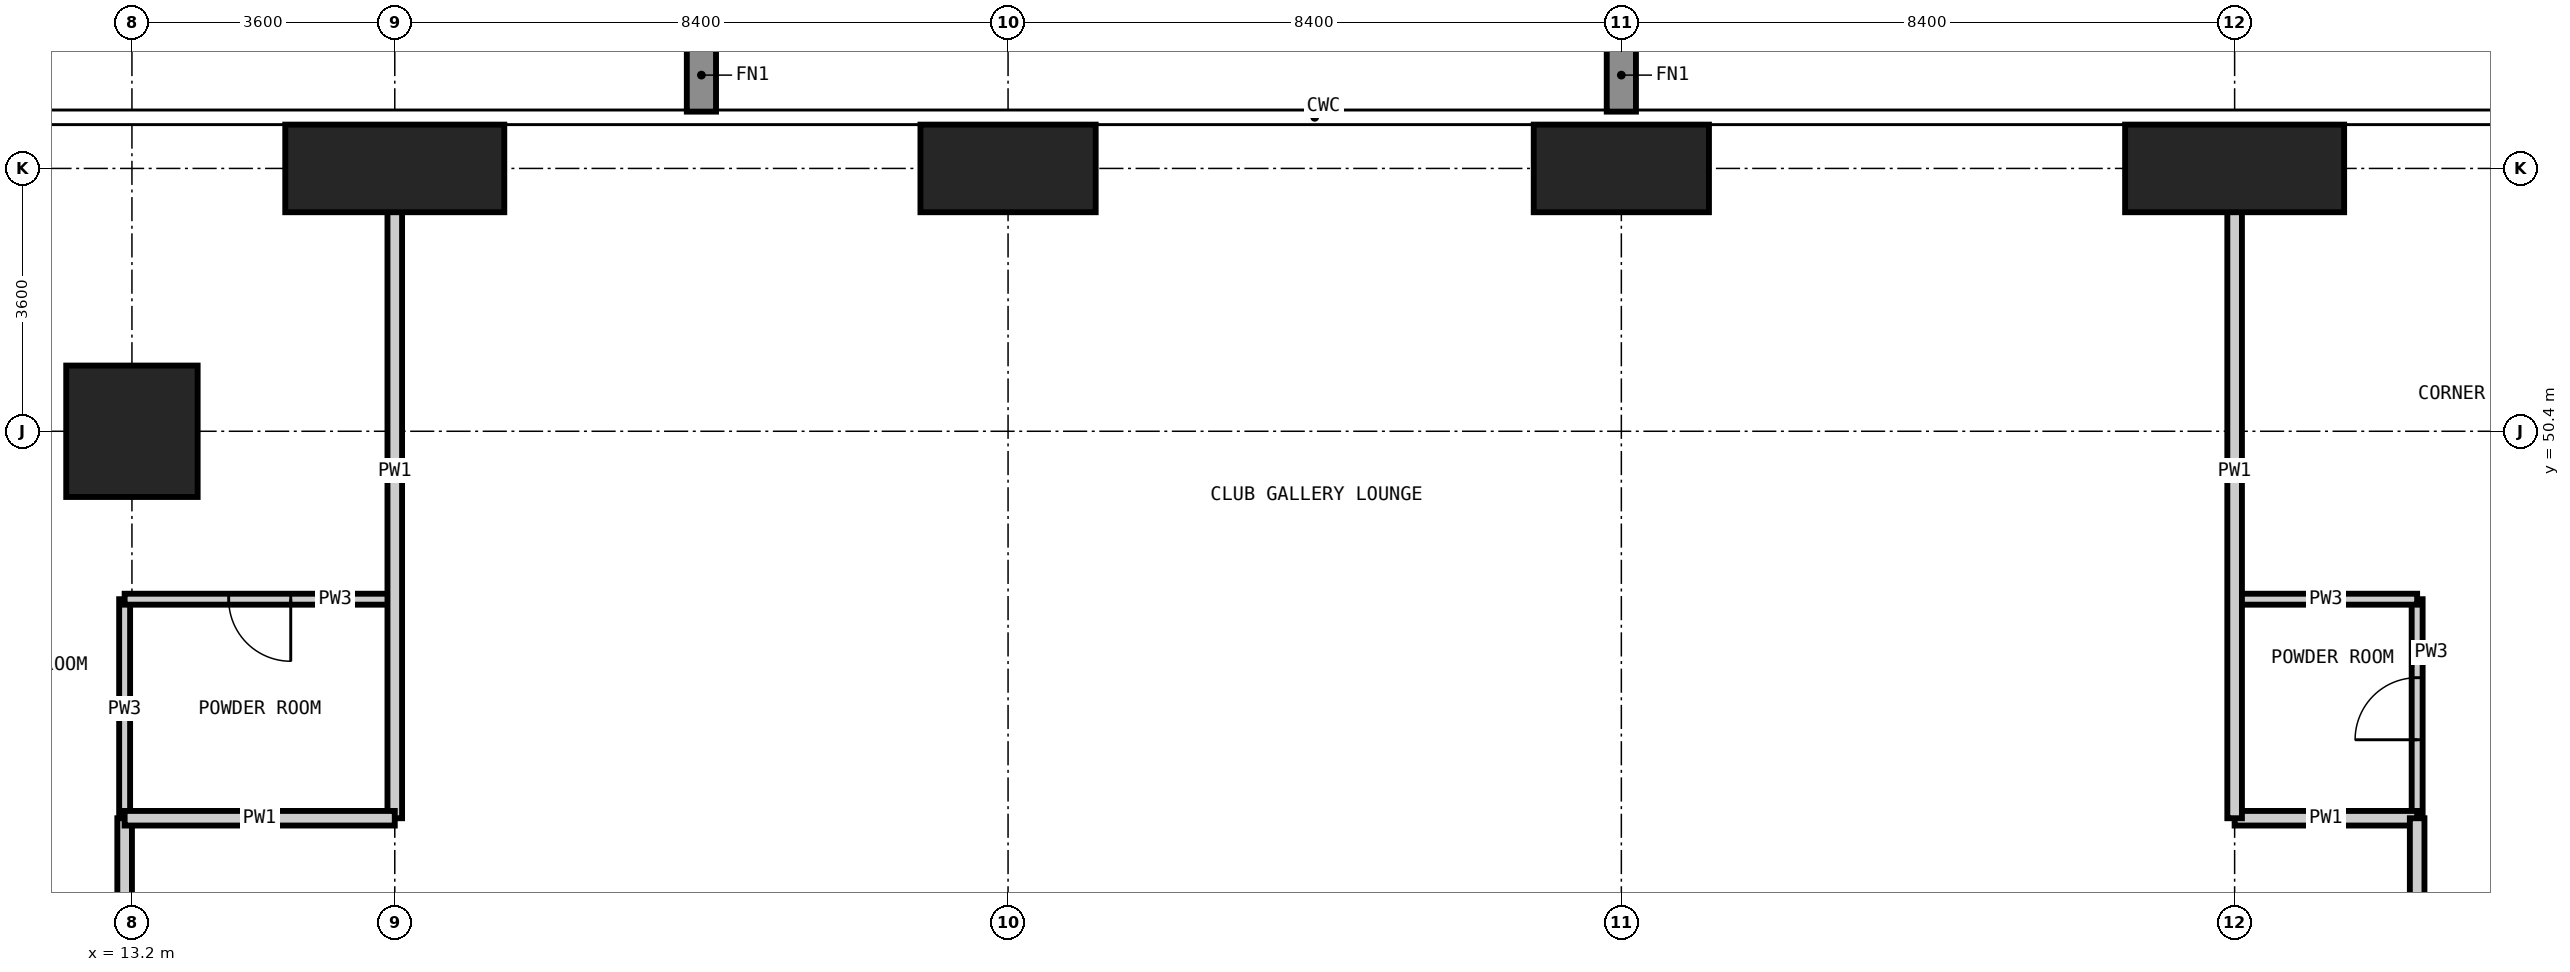
"""IFC4 building model, lengths in metres.
Left out: names, types, materials, properties, quantities, classifications, styles, units other than length and angle.
Written with IfcOpenShell. Run it as: python <this file> out.ifc"""

import sys

from ifc_helpers import new_model, si_unit, direction, frame, frame_2d, origin, origin_2d, place, context, subcontext, project, spatial, rectangle, extrude, element, fill, save


model = new_model("IFC4")
c1 = context("Model", 3, precision=1e-05, world=origin(), true_north=direction((0.0, 1.0)))
c2 = subcontext(c1, "Body", "Model", "MODEL_VIEW")
j1 = project(units=[si_unit("LENGTHUNIT", "METRE"), si_unit("PLANEANGLEUNIT", "RADIAN")], contexts=[c1])
p1 = place(None, origin())
s1 = spatial("IfcSite", under=j1, at=p1, CompositionType="ELEMENT")
p2 = place(p1, origin())
s2 = spatial("IfcBuilding", under=s1, at=p2, CompositionType="ELEMENT")
p3 = place(p2, frame((0.0, 0.0, 216.6)))
s3 = spatial("IfcBuildingStorey", under=s2, at=p3, CompositionType="ELEMENT", Elevation=216.6)
p4 = place(p3, frame((13.2, 50.4, -0.35), z_axis=(0.0, 0.0, 1.0), x_axis=(1.0, 0.0, 0.0)))
e1 = element("IfcColumn", 1, at=p4, inside=s3, PredefinedType="COLUMN", context=c2, shape_type="SweptSolid", body=[
    extrude(rectangle(XDim=1.8, YDim=1.8, at=origin_2d()), origin(), (0.0, 0.0, 1.0), 3.55),
])
p5 = place(p3, frame((16.8, 54.0, -0.35), z_axis=(0.0, 0.0, 1.0), x_axis=(1.0, 0.0, 0.0)))
e2 = element("IfcColumn", 2, at=p5, inside=s3, PredefinedType="COLUMN", context=c2, shape_type="SweptSolid", body=[
    extrude(rectangle(XDim=3.0, YDim=1.2, at=origin_2d()), origin(), (0.0, 0.0, 1.0), 3.55),
])
for number, where, z_axis, x_axis in (
    (3, (25.2, 54.0, -0.35), (0.0, 0.0, 1.0), (1.0, 0.0, 0.0)),
    (4, (33.6, 54.0, -0.35), (0.0, 0.0, 1.0), (1.0, 0.0, 0.0)),
):
    element("IfcColumn", number, at=place(p3, frame(where, z_axis=z_axis, x_axis=x_axis)), inside=s3, PredefinedType="COLUMN", context=c2, shape_type="SweptSolid", body=[
        extrude(rectangle(XDim=2.4, YDim=1.2, at=origin_2d()), origin(), (0.0, 0.0, 1.0), 3.55),
    ])
p6 = place(p3, frame((42.0, 54.0, -0.35), z_axis=(0.0, 0.0, 1.0), x_axis=(1.0, 0.0, 0.0)))
e5 = element("IfcColumn", 5, at=p6, inside=s3, PredefinedType="COLUMN", context=c2, shape_type="SweptSolid", body=[
    extrude(rectangle(XDim=3.0, YDim=1.2, at=origin_2d()), origin(), (0.0, 0.0, 1.0), 3.55),
])
p7 = place(p3, frame((13.1, 45.1, 0.0), z_axis=(0.0, 0.0, 1.0), x_axis=(0.0, 1.0, 0.0)))
e6 = element("IfcWall", 6, at=p7, inside=s3, PredefinedType="PARTITIONING", context=c2, shape_type="SweptSolid", body=[
    extrude(rectangle(XDim=3.0, YDim=0.15, at=frame_2d((1.5, 0.0))), origin(), (0.0, 0.0, 1.0), 3.2),
])
p8 = place(p3, frame((44.5, 45.1, 0.0), z_axis=(0.0, 0.0, 1.0), x_axis=(0.0, 1.0, 0.0)))
e7 = element("IfcWall", 7, at=p8, inside=s3, PredefinedType="PARTITIONING", context=c2, shape_type="SweptSolid", body=[
    extrude(rectangle(XDim=3.0, YDim=0.15, at=frame_2d((1.5, 0.0))), origin(), (0.0, 0.0, 1.0), 3.2),
])
p9 = place(p8, frame((1.075, 0.0, 0.0)))
e8 = element("IfcOpeningElement", 8, at=p9, cuts=e7, PredefinedType="OPENING", context=c2, shape_type="SweptSolid", body=[
    extrude(rectangle(XDim=0.85, YDim=2.1, at=frame_2d((0.425, 1.05))), frame((0.0, 0.085, 0.0), z_axis=(0.0, -1.0, 0.0), x_axis=(1.0, 0.0, 0.0)), (0.0, 0.0, 1.0), 0.17),
])
p10 = place(p3, frame((13.1, 48.1, 0.0), z_axis=(0.0, 0.0, 1.0), x_axis=(1.0, 0.0, 0.0)))
e9 = element("IfcWall", 9, at=p10, inside=s3, PredefinedType="PARTITIONING", context=c2, shape_type="SweptSolid", body=[
    extrude(rectangle(XDim=3.7, YDim=0.15, at=frame_2d((1.85, 0.0))), origin(), (0.0, 0.0, 1.0), 3.2),
])
p11 = place(p10, frame((1.425, 0.0, 0.0)))
e10 = element("IfcOpeningElement", 10, at=p11, cuts=e9, PredefinedType="OPENING", context=c2, shape_type="SweptSolid", body=[
    extrude(rectangle(XDim=0.85, YDim=2.1, at=frame_2d((0.425, 1.05))), frame((0.0, 0.085, 0.0), z_axis=(0.0, -1.0, 0.0), x_axis=(1.0, 0.0, 0.0)), (0.0, 0.0, 1.0), 0.17),
])
p12 = place(p3, frame((42.0, 48.1, 0.0), z_axis=(0.0, 0.0, 1.0), x_axis=(1.0, 0.0, 0.0)))
e11 = element("IfcWall", 11, at=p12, inside=s3, PredefinedType="PARTITIONING", context=c2, shape_type="SweptSolid", body=[
    extrude(rectangle(XDim=2.5, YDim=0.15, at=frame_2d((1.25, 0.0))), origin(), (0.0, 0.0, 1.0), 3.2),
])
p13 = place(p3, frame((13.1, 13.1, 0.0), z_axis=(0.0, 0.0, 1.0), x_axis=(0.0, 1.0, 0.0)))
e12 = element("IfcWall", 12, at=p13, inside=s3, PredefinedType="PARTITIONING", context=c2, shape_type="SweptSolid", body=[
    extrude(rectangle(XDim=32.0, YDim=0.2, at=frame_2d((16.0, 0.0))), origin(), (0.0, 0.0, 1.0), 3.2),
])
p14 = place(p13, frame((5.3, 0.0, 0.0)))
e13 = element("IfcOpeningElement", 13, at=p14, cuts=e12, PredefinedType="OPENING", context=c2, shape_type="SweptSolid", body=[
    extrude(rectangle(XDim=1.0, YDim=2.2, at=frame_2d((0.5, 1.1))), frame((0.0, 0.11, 0.0), z_axis=(0.0, -1.0, 0.0), x_axis=(1.0, 0.0, 0.0)), (0.0, 0.0, 1.0), 0.22),
])
p15 = place(p13, frame((13.1, 0.0, 0.0)))
e14 = element("IfcOpeningElement", 14, at=p15, cuts=e12, PredefinedType="OPENING", context=c2, shape_type="SweptSolid", body=[
    extrude(rectangle(XDim=1.0, YDim=2.2, at=frame_2d((0.5, 1.1))), frame((0.0, 0.11, 0.0), z_axis=(0.0, -1.0, 0.0), x_axis=(1.0, 0.0, 0.0)), (0.0, 0.0, 1.0), 0.22),
])
p16 = place(p13, frame((18.5, 0.0, 0.0)))
e15 = element("IfcOpeningElement", 15, at=p16, cuts=e12, PredefinedType="OPENING", context=c2, shape_type="SweptSolid", body=[
    extrude(rectangle(XDim=1.0, YDim=2.2, at=frame_2d((0.5, 1.1))), frame((0.0, 0.11, 0.0), z_axis=(0.0, -1.0, 0.0), x_axis=(1.0, 0.0, 0.0)), (0.0, 0.0, 1.0), 0.22),
])
p17 = place(p13, frame((26.3, 0.0, 0.0)))
e16 = element("IfcOpeningElement", 16, at=p17, cuts=e12, PredefinedType="OPENING", context=c2, shape_type="SweptSolid", body=[
    extrude(rectangle(XDim=1.0, YDim=2.2, at=frame_2d((0.5, 1.1))), frame((0.0, 0.11, 0.0), z_axis=(0.0, -1.0, 0.0), x_axis=(1.0, 0.0, 0.0)), (0.0, 0.0, 1.0), 0.22),
])
p18 = place(p13, frame((1.35, 0.0, 0.0)))
e17 = element("IfcOpeningElement", 17, at=p18, cuts=e12, PredefinedType="OPENING", context=c2, shape_type="SweptSolid", body=[
    extrude(rectangle(XDim=1.0, YDim=2.2, at=frame_2d((0.5, 1.1))), frame((0.0, 0.11, 0.0), z_axis=(0.0, -1.0, 0.0), x_axis=(1.0, 0.0, 0.0)), (0.0, 0.0, 1.0), 0.22),
])
p19 = place(p13, frame((29.95, 0.0, 0.0)))
e18 = element("IfcOpeningElement", 18, at=p19, cuts=e12, PredefinedType="OPENING", context=c2, shape_type="SweptSolid", body=[
    extrude(rectangle(XDim=1.0, YDim=2.2, at=frame_2d((0.5, 1.1))), frame((0.0, 0.11, 0.0), z_axis=(0.0, -1.0, 0.0), x_axis=(1.0, 0.0, 0.0)), (0.0, 0.0, 1.0), 0.22),
])
p20 = place(p3, frame((16.8, 45.1, 0.0), z_axis=(0.0, 0.0, 1.0), x_axis=(0.0, 1.0, 0.0)))
e19 = element("IfcWall", 19, at=p20, inside=s3, PredefinedType="PARTITIONING", context=c2, shape_type="SweptSolid", body=[
    extrude(rectangle(XDim=9.518, YDim=0.2, at=frame_2d((4.759, 0.0))), origin(), (0.0, 0.0, 1.0), 3.2),
])
p21 = place(p3, frame((13.1, 45.1, 0.0), z_axis=(0.0, 0.0, 1.0), x_axis=(1.0, 0.0, 0.0)))
e20 = element("IfcWall", 20, at=p21, inside=s3, PredefinedType="PARTITIONING", context=c2, shape_type="SweptSolid", body=[
    extrude(rectangle(XDim=3.7, YDim=0.2, at=frame_2d((1.85, 0.0))), origin(), (0.0, 0.0, 1.0), 3.2),
])
p22 = place(p3, frame((42.0, 45.1, 0.0), z_axis=(0.0, 0.0, 1.0), x_axis=(1.0, 0.0, 0.0)))
e21 = element("IfcWall", 21, at=p22, inside=s3, PredefinedType="PARTITIONING", context=c2, shape_type="SweptSolid", body=[
    extrude(rectangle(XDim=2.5, YDim=0.2, at=frame_2d((1.25, 0.0))), origin(), (0.0, 0.0, 1.0), 3.2),
])
p23 = place(p3, frame((42.0, 54.618, 0.0), z_axis=(0.0, 0.0, 1.0), x_axis=(0.0, -1.0, 0.0)))
e22 = element("IfcWall", 22, at=p23, inside=s3, PredefinedType="PARTITIONING", context=c2, shape_type="SweptSolid", body=[
    extrude(rectangle(XDim=9.518, YDim=0.2, at=frame_2d((4.759, 0.0))), origin(), (0.0, 0.0, 1.0), 3.2),
])
p24 = place(p3, frame((44.5, 45.1, 0.0), z_axis=(0.0, 0.0, 1.0), x_axis=(0.0, -1.0, 0.0)))
e23 = element("IfcWall", 23, at=p24, inside=s3, PredefinedType="PARTITIONING", context=c2, shape_type="SweptSolid", body=[
    extrude(rectangle(XDim=32.0, YDim=0.2, at=frame_2d((16.0, 0.0))), origin(), (0.0, 0.0, 1.0), 3.2),
])
p25 = place(p24, frame((25.7, 0.0, 0.0)))
e24 = element("IfcOpeningElement", 24, at=p25, cuts=e23, PredefinedType="OPENING", context=c2, shape_type="SweptSolid", body=[
    extrude(rectangle(XDim=1.0, YDim=2.2, at=frame_2d((0.5, 1.1))), frame((0.0, 0.11, 0.0), z_axis=(0.0, -1.0, 0.0), x_axis=(1.0, 0.0, 0.0)), (0.0, 0.0, 1.0), 0.22),
])
p26 = place(p24, frame((19.4, 0.0, 0.0)))
e25 = element("IfcOpeningElement", 25, at=p26, cuts=e23, PredefinedType="OPENING", context=c2, shape_type="SweptSolid", body=[
    extrude(rectangle(XDim=1.0, YDim=2.2, at=frame_2d((0.5, 1.1))), frame((0.0, 0.11, 0.0), z_axis=(0.0, -1.0, 0.0), x_axis=(1.0, 0.0, 0.0)), (0.0, 0.0, 1.0), 0.22),
])
p27 = place(p24, frame((11.0, 0.0, 0.0)))
e26 = element("IfcOpeningElement", 26, at=p27, cuts=e23, PredefinedType="OPENING", context=c2, shape_type="SweptSolid", body=[
    extrude(rectangle(XDim=1.0, YDim=2.2, at=frame_2d((0.5, 1.1))), frame((0.0, 0.11, 0.0), z_axis=(0.0, -1.0, 0.0), x_axis=(1.0, 0.0, 0.0)), (0.0, 0.0, 1.0), 0.22),
])
p28 = place(p24, frame((4.7, 0.0, 0.0)))
e27 = element("IfcOpeningElement", 27, at=p28, cuts=e23, PredefinedType="OPENING", context=c2, shape_type="SweptSolid", body=[
    extrude(rectangle(XDim=1.0, YDim=2.2, at=frame_2d((0.5, 1.1))), frame((0.0, 0.11, 0.0), z_axis=(0.0, -1.0, 0.0), x_axis=(1.0, 0.0, 0.0)), (0.0, 0.0, 1.0), 0.22),
])
p29 = place(p24, frame((29.65, 0.0, 0.0)))
e28 = element("IfcOpeningElement", 28, at=p29, cuts=e23, PredefinedType="OPENING", context=c2, shape_type="SweptSolid", body=[
    extrude(rectangle(XDim=1.0, YDim=2.2, at=frame_2d((0.5, 1.1))), frame((0.0, 0.11, 0.0), z_axis=(0.0, -1.0, 0.0), x_axis=(1.0, 0.0, 0.0)), (0.0, 0.0, 1.0), 0.22),
])
p30 = place(p24, frame((1.05, 0.0, 0.0)))
e29 = element("IfcOpeningElement", 29, at=p30, cuts=e23, PredefinedType="OPENING", context=c2, shape_type="SweptSolid", body=[
    extrude(rectangle(XDim=1.0, YDim=2.2, at=frame_2d((0.5, 1.1))), frame((0.0, 0.11, 0.0), z_axis=(0.0, -1.0, 0.0), x_axis=(1.0, 0.0, 0.0)), (0.0, 0.0, 1.0), 0.22),
])
p31 = place(p9, origin())
e30 = element("IfcDoor", 30, at=p31, inside=s3, OperationType="SINGLE_SWING_LEFT", PredefinedType="DOOR", context=c2, shape_type="SweptSolid", body=[
    extrude(rectangle(XDim=0.85, YDim=2.1, at=frame_2d((0.425, 1.05))), frame((0.0, 0.025, 0.0), z_axis=(0.0, -1.0, 0.0), x_axis=(1.0, 0.0, 0.0)), (0.0, 0.0, 1.0), 0.05),
])
fill(e8, e30)
p32 = place(p11, frame((0.85, 0.0, 0.0), z_axis=(0.0, 0.0, 1.0), x_axis=(-1.0, 0.0, 0.0)))
e31 = element("IfcDoor", 31, at=p32, inside=s3, OperationType="SINGLE_SWING_LEFT", PredefinedType="DOOR", context=c2, shape_type="SweptSolid", body=[
    extrude(rectangle(XDim=0.85, YDim=2.1, at=frame_2d((0.425, 1.05))), frame((0.0, 0.025, 0.0), z_axis=(0.0, -1.0, 0.0), x_axis=(1.0, 0.0, 0.0)), (0.0, 0.0, 1.0), 0.05),
])
fill(e10, e31)
save(model, sys.argv[1])
